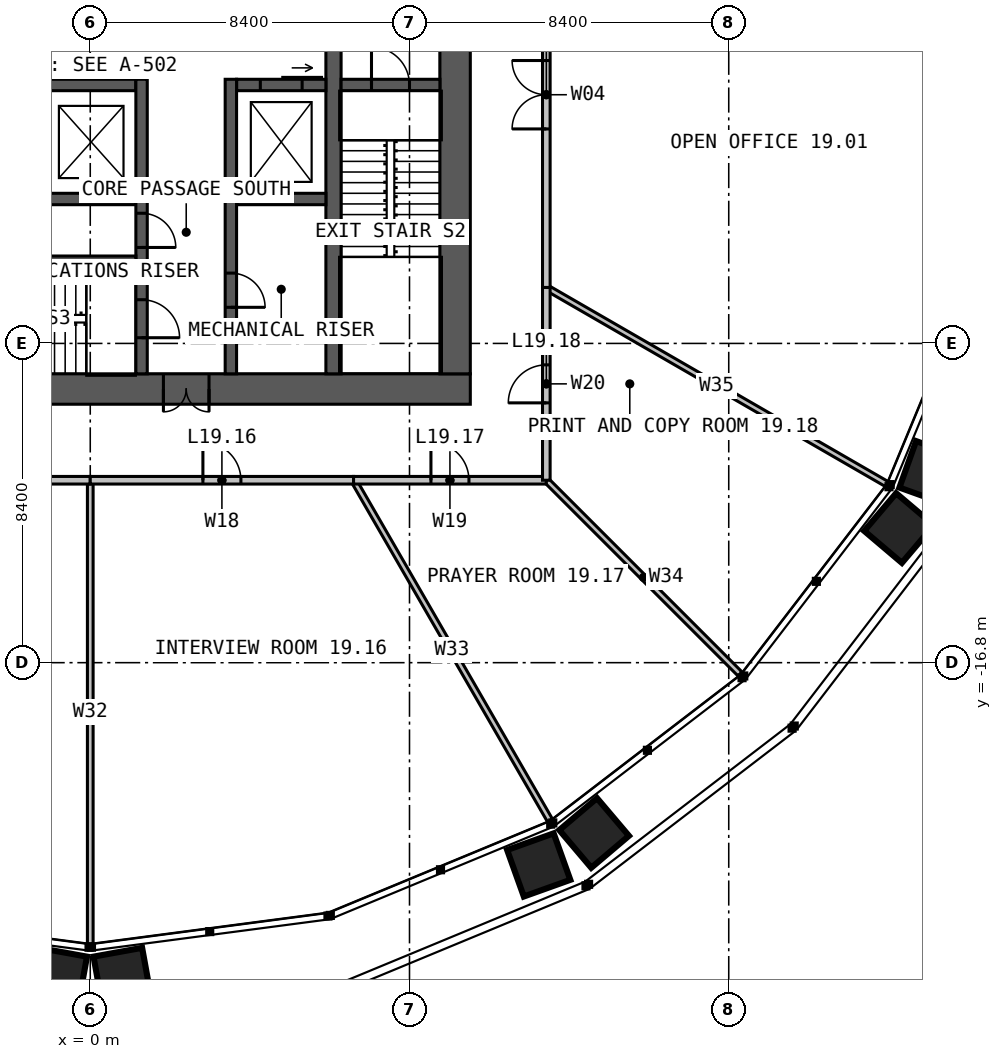
"""IFC4 building model, lengths in metres.
Left out: names, types, materials, properties, quantities, classifications, styles, units other than length and angle.
Written with IfcOpenShell. Run it as: python <this file> out.ifc"""

import sys

from ifc_helpers import new_model, si_unit, direction, frame, frame_2d, origin, place, context, subcontext, project, spatial, rectangle, extrude, element, fill, save


model = new_model("IFC4")
c1 = context("Model", 3, precision=1e-05, world=origin(), true_north=direction((0.0, 1.0)))
c2 = subcontext(c1, "Body", "Model", "MODEL_VIEW")
j1 = project(units=[si_unit("LENGTHUNIT", "METRE"), si_unit("PLANEANGLEUNIT", "RADIAN")], contexts=[c1])
p1 = place(None, origin())
s1 = spatial("IfcSite", under=j1, at=p1, CompositionType="ELEMENT")
p2 = place(p1, origin())
s2 = spatial("IfcBuilding", under=s1, at=p2, CompositionType="ELEMENT")
p3 = place(p2, frame((0.0, 0.0, 81.0)))
s3 = spatial("IfcBuildingStorey", under=s2, at=p3, CompositionType="ELEMENT", Elevation=81.0)
p4 = place(p3, frame((10.0, -9.6, 0.0), z_axis=(0.0, 0.0, 1.0), x_axis=(-1.0, 0.0, 0.0)))
e1 = element("IfcWall", 1, at=p4, inside=s3, PredefinedType="SOLIDWALL", context=c2, shape_type="SweptSolid", body=[
    extrude(rectangle(XDim=20.0, YDim=0.8, at=frame_2d((10.0, 0.0))), origin(), (0.0, 0.0, 1.0), 4.0),
])
p5 = place(p4, frame((6.875, 0.0, 0.0)))
e2 = element("IfcOpeningElement", 2, at=p5, cuts=e1, PredefinedType="OPENING", context=c2, shape_type="SweptSolid", body=[
    extrude(rectangle(XDim=1.2, YDim=2.2, at=frame_2d((0.6, 1.1))), frame((0.0, 0.41, 0.0), z_axis=(0.0, -1.0, 0.0), x_axis=(1.0, 0.0, 0.0)), (0.0, 0.0, 1.0), 0.82),
])
p6 = place(p3, frame((9.6, -9.2, 0.0), z_axis=(0.0, 0.0, 1.0), x_axis=(0.0, 1.0, 0.0)))
e3 = element("IfcWall", 3, at=p6, inside=s3, PredefinedType="SOLIDWALL", context=c2, shape_type="SweptSolid", body=[
    extrude(rectangle(XDim=18.4, YDim=0.8, at=frame_2d((9.2, 0.0))), origin(), (0.0, 0.0, 1.0), 4.0),
])
p7 = place(p3, frame((6.4, 9.2, 0.0), z_axis=(0.0, 0.0, 1.0), x_axis=(0.0, -1.0, 0.0)))
e4 = element("IfcWall", 4, at=p7, inside=s3, PredefinedType="SOLIDWALL", context=c2, shape_type="SweptSolid", body=[
    extrude(rectangle(XDim=18.4, YDim=0.4, at=frame_2d((9.2, 0.0))), origin(), (0.0, 0.0, 1.0), 4.0),
])
p8 = place(p7, frame((8.7, 0.0, 0.0)))
e5 = element("IfcOpeningElement", 5, at=p8, cuts=e4, PredefinedType="OPENING", context=c2, shape_type="SweptSolid", body=[
    extrude(rectangle(XDim=1.0, YDim=2.2, at=frame_2d((0.5, 1.1))), frame((0.0, 0.21, 0.0), z_axis=(0.0, -1.0, 0.0), x_axis=(1.0, 0.0, 0.0)), (0.0, 0.0, 1.0), 0.42),
])
p9 = place(p3, frame((-6.2, -1.6, 0.0), z_axis=(0.0, 0.0, 1.0), x_axis=(1.0, 0.0, 0.0)))
e6 = element("IfcWall", 6, at=p9, inside=s3, PredefinedType="SOLIDWALL", context=c2, shape_type="SweptSolid", body=[
    extrude(rectangle(XDim=7.4, YDim=0.3, at=frame_2d((3.7, 0.0))), origin(), (0.0, 0.0, 1.0), 4.0),
])
p10 = place(p3, frame((3.85, -1.6, 0.0), z_axis=(0.0, 0.0, 1.0), x_axis=(1.0, 0.0, 0.0)))
e7 = element("IfcWall", 7, at=p10, inside=s3, PredefinedType="SOLIDWALL", context=c2, shape_type="SweptSolid", body=[
    extrude(rectangle(XDim=2.35, YDim=0.3, at=frame_2d((1.175, 0.0))), origin(), (0.0, 0.0, 1.0), 4.0),
])
p11 = place(p10, frame((0.625, 0.0, 0.0)))
e8 = element("IfcOpeningElement", 8, at=p11, cuts=e7, PredefinedType="OPENING", context=c2, shape_type="SweptSolid", body=[
    extrude(rectangle(XDim=1.1, YDim=2.2, at=frame_2d((0.55, 1.1))), frame((0.0, 0.16, 0.0), z_axis=(0.0, -1.0, 0.0), x_axis=(1.0, 0.0, 0.0)), (0.0, 0.0, 1.0), 0.32),
])
p12 = place(p3, frame((-6.2, -4.6, 0.0), z_axis=(0.0, 0.0, 1.0), x_axis=(1.0, 0.0, 0.0)))
e9 = element("IfcWall", 9, at=p12, inside=s3, PredefinedType="SOLIDWALL", context=c2, shape_type="SweptSolid", body=[
    extrude(rectangle(XDim=7.4, YDim=0.3, at=frame_2d((3.7, 0.0))), origin(), (0.0, 0.0, 1.0), 4.0),
])
p13 = place(p3, frame((3.85, -4.6, 0.0), z_axis=(0.0, 0.0, 1.0), x_axis=(1.0, 0.0, 0.0)))
e10 = element("IfcWall", 10, at=p13, inside=s3, PredefinedType="SOLIDWALL", context=c2, shape_type="SweptSolid", body=[
    extrude(rectangle(XDim=2.35, YDim=0.3, at=frame_2d((1.175, 0.0))), origin(), (0.0, 0.0, 1.0), 4.0),
])
p14 = place(p3, frame((1.35, -1.45, 0.0), z_axis=(0.0, 0.0, 1.0), x_axis=(0.0, -1.0, 0.0)))
e11 = element("IfcWall", 11, at=p14, inside=s3, PredefinedType="SOLIDWALL", context=c2, shape_type="SweptSolid", body=[
    extrude(rectangle(XDim=7.75, YDim=0.3, at=frame_2d((3.875, 0.0))), origin(), (0.0, 0.0, 1.0), 4.0),
])
p15 = place(p14, frame((5.8, 0.0, 0.0)))
e12 = element("IfcOpeningElement", 12, at=p15, cuts=e11, PredefinedType="OPENING", context=c2, shape_type="SweptSolid", body=[
    extrude(rectangle(XDim=1.0, YDim=2.2, at=frame_2d((0.5, 1.1))), frame((0.0, 0.16, 0.0), z_axis=(0.0, -1.0, 0.0), x_axis=(1.0, 0.0, 0.0)), (0.0, 0.0, 1.0), 0.32),
])
p16 = place(p14, frame((3.525, 0.0, 0.0)))
e13 = element("IfcOpeningElement", 13, at=p16, cuts=e11, PredefinedType="OPENING", context=c2, shape_type="SweptSolid", body=[
    extrude(rectangle(XDim=0.9, YDim=2.2, at=frame_2d((0.45, 1.1))), frame((0.0, 0.16, 0.0), z_axis=(0.0, -1.0, 0.0), x_axis=(1.0, 0.0, 0.0)), (0.0, 0.0, 1.0), 0.32),
])
p17 = place(p3, frame((3.7, -1.45, 0.0), z_axis=(0.0, 0.0, 1.0), x_axis=(0.0, -1.0, 0.0)))
e14 = element("IfcWall", 14, at=p17, inside=s3, PredefinedType="SOLIDWALL", context=c2, shape_type="SweptSolid", body=[
    extrude(rectangle(XDim=7.75, YDim=0.3, at=frame_2d((3.875, 0.0))), origin(), (0.0, 0.0, 1.0), 4.0),
])
p18 = place(p17, frame((5.1, 0.0, 0.0)))
e15 = element("IfcOpeningElement", 15, at=p18, cuts=e14, PredefinedType="OPENING", context=c2, shape_type="SweptSolid", body=[
    extrude(rectangle(XDim=0.9, YDim=2.2, at=frame_2d((0.45, 1.1))), frame((0.0, 0.16, 0.0), z_axis=(0.0, -1.0, 0.0), x_axis=(1.0, 0.0, 0.0)), (0.0, 0.0, 1.0), 0.32),
])
p19 = place(p3, frame((-6.2, -6.2, 0.0), z_axis=(0.0, 0.0, 1.0), x_axis=(1.0, 0.0, 0.0)))
e16 = element("IfcWall", 16, at=p19, inside=s3, PredefinedType="SOLIDWALL", context=c2, shape_type="SweptSolid", body=[
    extrude(rectangle(XDim=7.4, YDim=0.2, at=frame_2d((3.7, 0.0))), origin(), (0.0, 0.0, 1.0), 4.0),
])
p20 = place(p3, frame((6.6, -1.6, 0.0), z_axis=(0.0, 0.0, 1.0), x_axis=(1.0, 0.0, 0.0)))
e17 = element("IfcWall", 17, at=p20, inside=s3, PredefinedType="SOLIDWALL", context=c2, shape_type="SweptSolid", body=[
    extrude(rectangle(XDim=2.6, YDim=0.3, at=frame_2d((1.3, 0.0))), origin(), (0.0, 0.0, 1.0), 4.0),
])
p21 = place(p20, frame((0.8, 0.0, 0.0)))
e18 = element("IfcOpeningElement", 18, at=p21, cuts=e17, PredefinedType="OPENING", context=c2, shape_type="SweptSolid", body=[
    extrude(rectangle(XDim=1.0, YDim=2.2, at=frame_2d((0.5, 1.1))), frame((0.0, 0.16, 0.0), z_axis=(0.0, -1.0, 0.0), x_axis=(1.0, 0.0, 0.0)), (0.0, 0.0, 1.0), 0.32),
])
p22 = place(p3, frame((12.0, -6.928, 0.0), z_axis=(0.0, 0.0, 1.0), x_axis=(0.866023632182, -0.500003068493, 0.0)))
e19 = element("IfcWall", 19, at=p22, inside=s3, PredefinedType="PARTITIONING", context=c2, shape_type="SweptSolid", body=[
    extrude(rectangle(XDim=10.343, YDim=0.15, at=frame_2d((5.171, 0.0))), origin(), (0.0, 0.0, 1.0), 2.79),
])
p23 = place(p3, frame((0.0, -12.0, 0.0), z_axis=(0.0, 0.0, 1.0), x_axis=(0.0, -1.0, 0.0)))
e20 = element("IfcWall", 20, at=p23, inside=s3, PredefinedType="PARTITIONING", context=c2, shape_type="SweptSolid", body=[
    extrude(rectangle(XDim=12.199, YDim=0.15, at=frame_2d((6.1, 0.0))), origin(), (0.0, 0.0, 1.0), 2.79),
])
p24 = place(p3, frame((6.928, -12.0, 0.0), z_axis=(0.0, 0.0, 1.0), x_axis=(0.500003068493, -0.866023632182, 0.0)))
e21 = element("IfcWall", 21, at=p24, inside=s3, PredefinedType="PARTITIONING", context=c2, shape_type="SweptSolid", body=[
    extrude(rectangle(XDim=10.343, YDim=0.15, at=frame_2d((5.171, 0.0))), origin(), (0.0, 0.0, 1.0), 2.79),
])
p25 = place(p3, frame((12.0, -12.0, 0.0), z_axis=(0.0, 0.0, 1.0), x_axis=(0.707106781187, -0.707106781187, 0.0)))
e22 = element("IfcWall", 22, at=p25, inside=s3, PredefinedType="PARTITIONING", context=c2, shape_type="SweptSolid", body=[
    extrude(rectangle(XDim=7.229, YDim=0.15, at=frame_2d((3.614, 0.0))), origin(), (0.0, 0.0, 1.0), 2.79),
])
p26 = place(p3, frame((12.0, -6.928, 0.0), z_axis=(0.0, 0.0, 1.0), x_axis=(0.0, 1.0, 0.0)))
e23 = element("IfcWall", 23, at=p26, inside=s3, PredefinedType="PARTITIONING", context=c2, shape_type="SweptSolid", body=[
    extrude(rectangle(XDim=10.144, YDim=0.2, at=frame_2d((5.072, 0.0))), origin(), (0.0, 0.0, 1.0), 3.8),
])
p27 = place(p26, frame((4.172, 0.0, 0.0)))
e24 = element("IfcOpeningElement", 24, at=p27, cuts=e23, PredefinedType="OPENING", context=c2, shape_type="SweptSolid", body=[
    extrude(rectangle(XDim=1.8, YDim=2.2, at=frame_2d((0.9, 1.1))), frame((0.0, 0.11, 0.0), z_axis=(0.0, -1.0, 0.0), x_axis=(1.0, 0.0, 0.0)), (0.0, 0.0, 1.0), 0.22),
])
p28 = place(p3, frame((-6.928, -12.0, 0.0), z_axis=(0.0, 0.0, 1.0), x_axis=(1.0, 0.0, 0.0)))
e25 = element("IfcWall", 25, at=p28, inside=s3, PredefinedType="PARTITIONING", context=c2, shape_type="SweptSolid", body=[
    extrude(rectangle(XDim=6.928, YDim=0.2, at=frame_2d((3.464, 0.0))), origin(), (0.0, 0.0, 1.0), 3.8),
])
p29 = place(p28, frame((2.964, 0.0, 0.0)))
e26 = element("IfcOpeningElement", 26, at=p29, cuts=e25, PredefinedType="OPENING", context=c2, shape_type="SweptSolid", body=[
    extrude(rectangle(XDim=1.0, YDim=2.2, at=frame_2d((0.5, 1.1))), frame((0.0, 0.11, 0.0), z_axis=(0.0, -1.0, 0.0), x_axis=(1.0, 0.0, 0.0)), (0.0, 0.0, 1.0), 0.22),
])
p30 = place(p3, frame((0.0, -12.0, 0.0), z_axis=(0.0, 0.0, 1.0), x_axis=(1.0, 0.0, 0.0)))
e27 = element("IfcWall", 27, at=p30, inside=s3, PredefinedType="PARTITIONING", context=c2, shape_type="SweptSolid", body=[
    extrude(rectangle(XDim=6.928, YDim=0.2, at=frame_2d((3.464, 0.0))), origin(), (0.0, 0.0, 1.0), 3.8),
])
p31 = place(p30, frame((2.964, 0.0, 0.0)))
e28 = element("IfcOpeningElement", 28, at=p31, cuts=e27, PredefinedType="OPENING", context=c2, shape_type="SweptSolid", body=[
    extrude(rectangle(XDim=1.0, YDim=2.2, at=frame_2d((0.5, 1.1))), frame((0.0, 0.11, 0.0), z_axis=(0.0, -1.0, 0.0), x_axis=(1.0, 0.0, 0.0)), (0.0, 0.0, 1.0), 0.22),
])
p32 = place(p3, frame((6.928, -12.0, 0.0), z_axis=(0.0, 0.0, 1.0), x_axis=(1.0, 0.0, 0.0)))
e29 = element("IfcWall", 29, at=p32, inside=s3, PredefinedType="PARTITIONING", context=c2, shape_type="SweptSolid", body=[
    extrude(rectangle(XDim=5.072, YDim=0.2, at=frame_2d((2.536, 0.0))), origin(), (0.0, 0.0, 1.0), 3.8),
])
p33 = place(p32, frame((2.036, 0.0, 0.0)))
e30 = element("IfcOpeningElement", 30, at=p33, cuts=e29, PredefinedType="OPENING", context=c2, shape_type="SweptSolid", body=[
    extrude(rectangle(XDim=1.0, YDim=2.2, at=frame_2d((0.5, 1.1))), frame((0.0, 0.11, 0.0), z_axis=(0.0, -1.0, 0.0), x_axis=(1.0, 0.0, 0.0)), (0.0, 0.0, 1.0), 0.22),
])
p34 = place(p3, frame((12.0, -12.0, 0.0), z_axis=(0.0, 0.0, 1.0), x_axis=(0.0, 1.0, 0.0)))
e31 = element("IfcWall", 31, at=p34, inside=s3, PredefinedType="PARTITIONING", context=c2, shape_type="SweptSolid", body=[
    extrude(rectangle(XDim=5.072, YDim=0.2, at=frame_2d((2.536, 0.0))), origin(), (0.0, 0.0, 1.0), 3.8),
])
p35 = place(p34, frame((2.036, 0.0, 0.0)))
e32 = element("IfcOpeningElement", 32, at=p35, cuts=e31, PredefinedType="OPENING", context=c2, shape_type="SweptSolid", body=[
    extrude(rectangle(XDim=1.0, YDim=2.2, at=frame_2d((0.5, 1.1))), frame((0.0, 0.11, 0.0), z_axis=(0.0, -1.0, 0.0), x_axis=(1.0, 0.0, 0.0)), (0.0, 0.0, 1.0), 0.22),
])
p36 = place(p5, origin())
e33 = element("IfcDoor", 33, at=p36, inside=s3, OperationType="DOUBLE_DOOR_SINGLE_SWING", PredefinedType="DOOR", context=c2, shape_type="SweptSolid", body=[
    extrude(rectangle(XDim=1.2, YDim=2.2, at=frame_2d((0.6, 1.1))), frame((0.0, 0.025, 0.0), z_axis=(0.0, -1.0, 0.0), x_axis=(1.0, 0.0, 0.0)), (0.0, 0.0, 1.0), 0.05),
])
fill(e2, e33)
p37 = place(p21, origin())
e34 = element("IfcDoor", 34, at=p37, inside=s3, OperationType="SINGLE_SWING_LEFT", PredefinedType="DOOR", context=c2, shape_type="SweptSolid", body=[
    extrude(rectangle(XDim=1.0, YDim=2.2, at=frame_2d((0.5, 1.1))), frame((0.0, 0.025, 0.0), z_axis=(0.0, -1.0, 0.0), x_axis=(1.0, 0.0, 0.0)), (0.0, 0.0, 1.0), 0.05),
])
fill(e18, e34)
p38 = place(p15, origin())
e35 = element("IfcDoor", 35, at=p38, inside=s3, OperationType="SINGLE_SWING_RIGHT", PredefinedType="DOOR", context=c2, shape_type="SweptSolid", body=[
    extrude(rectangle(XDim=1.0, YDim=2.2, at=frame_2d((0.5, 1.1))), frame((0.0, 0.025, 0.0), z_axis=(0.0, -1.0, 0.0), x_axis=(1.0, 0.0, 0.0)), (0.0, 0.0, 1.0), 0.05),
])
fill(e12, e35)
p39 = place(p16, origin())
e36 = element("IfcDoor", 36, at=p39, inside=s3, OperationType="SINGLE_SWING_RIGHT", PredefinedType="DOOR", context=c2, shape_type="SweptSolid", body=[
    extrude(rectangle(XDim=0.9, YDim=2.2, at=frame_2d((0.45, 1.1))), frame((0.0, 0.025, 0.0), z_axis=(0.0, -1.0, 0.0), x_axis=(1.0, 0.0, 0.0)), (0.0, 0.0, 1.0), 0.05),
])
fill(e13, e36)
p40 = place(p18, origin())
e37 = element("IfcDoor", 37, at=p40, inside=s3, OperationType="SINGLE_SWING_RIGHT", PredefinedType="DOOR", context=c2, shape_type="SweptSolid", body=[
    extrude(rectangle(XDim=0.9, YDim=2.2, at=frame_2d((0.45, 1.1))), frame((0.0, 0.025, 0.0), z_axis=(0.0, -1.0, 0.0), x_axis=(1.0, 0.0, 0.0)), (0.0, 0.0, 1.0), 0.05),
])
fill(e15, e37)
p41 = place(p11, origin())
e38 = element("IfcDoor", 38, at=p41, inside=s3, OperationType="SLIDING_TO_LEFT", PredefinedType="DOOR", context=c2, shape_type="SweptSolid", body=[
    extrude(rectangle(XDim=1.1, YDim=2.2, at=frame_2d((0.55, 1.1))), frame((0.0, 0.025, 0.0), z_axis=(0.0, -1.0, 0.0), x_axis=(1.0, 0.0, 0.0)), (0.0, 0.0, 1.0), 0.05),
])
fill(e8, e38)
p42 = place(p27, origin())
e39 = element("IfcDoor", 39, at=p42, inside=s3, OperationType="DOUBLE_DOOR_SINGLE_SWING", PredefinedType="DOOR", context=c2, shape_type="SweptSolid", body=[
    extrude(rectangle(XDim=1.8, YDim=2.2, at=frame_2d((0.9, 1.1))), frame((0.0, 0.025, 0.0), z_axis=(0.0, -1.0, 0.0), x_axis=(1.0, 0.0, 0.0)), (0.0, 0.0, 1.0), 0.05),
])
fill(e24, e39)
p43 = place(p31, origin())
e40 = element("IfcDoor", 40, at=p43, inside=s3, OperationType="SINGLE_SWING_LEFT", PredefinedType="DOOR", context=c2, shape_type="SweptSolid", body=[
    extrude(rectangle(XDim=1.0, YDim=2.2, at=frame_2d((0.5, 1.1))), frame((0.0, 0.025, 0.0), z_axis=(0.0, -1.0, 0.0), x_axis=(1.0, 0.0, 0.0)), (0.0, 0.0, 1.0), 0.05),
])
fill(e28, e40)
p44 = place(p33, origin())
e41 = element("IfcDoor", 41, at=p44, inside=s3, OperationType="SINGLE_SWING_LEFT", PredefinedType="DOOR", context=c2, shape_type="SweptSolid", body=[
    extrude(rectangle(XDim=1.0, YDim=2.2, at=frame_2d((0.5, 1.1))), frame((0.0, 0.025, 0.0), z_axis=(0.0, -1.0, 0.0), x_axis=(1.0, 0.0, 0.0)), (0.0, 0.0, 1.0), 0.05),
])
fill(e30, e41)
p45 = place(p35, origin())
e42 = element("IfcDoor", 42, at=p45, inside=s3, OperationType="SINGLE_SWING_LEFT", PredefinedType="DOOR", context=c2, shape_type="SweptSolid", body=[
    extrude(rectangle(XDim=1.0, YDim=2.2, at=frame_2d((0.5, 1.1))), frame((0.0, 0.025, 0.0), z_axis=(0.0, -1.0, 0.0), x_axis=(1.0, 0.0, 0.0)), (0.0, 0.0, 1.0), 0.05),
])
fill(e32, e42)
save(model, sys.argv[1])
